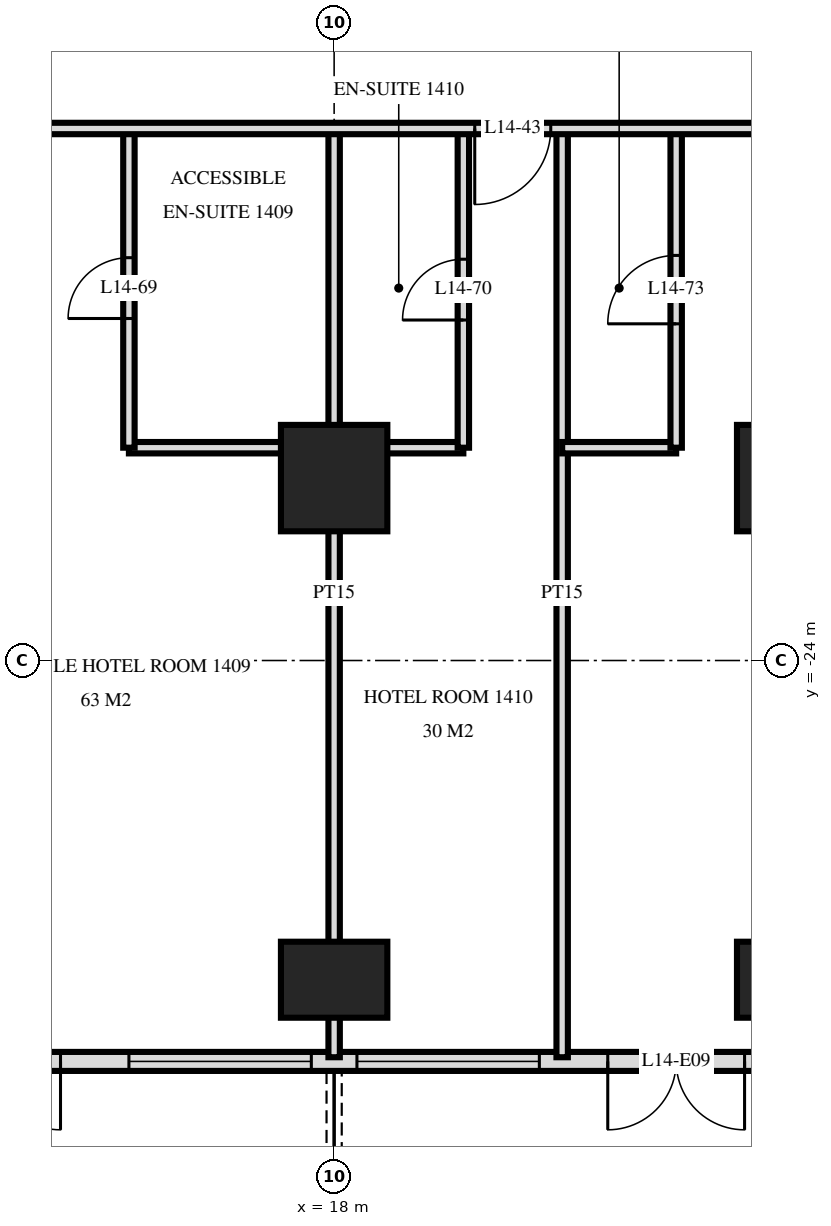
"""IFC4 building model, lengths in metres.
Left out: names, types, materials, properties, quantities, classifications, styles, units other than length and angle.
Written with IfcOpenShell. Run it as: python <this file> out.ifc"""

import sys

from ifc_helpers import new_model, si_unit, direction, frame, frame_2d, origin, origin_2d, place, context, subcontext, project, spatial, rectangle, extrude, element, fill, save


model = new_model("IFC4")
c1 = context("Model", 3, precision=1e-05, world=origin(), true_north=direction((0.0, 1.0)))
c2 = subcontext(c1, "Body", "Model", "MODEL_VIEW")
j1 = project(units=[si_unit("LENGTHUNIT", "METRE"), si_unit("PLANEANGLEUNIT", "RADIAN")], contexts=[c1])
p1 = place(None, origin())
s1 = spatial("IfcSite", under=j1, at=p1, CompositionType="ELEMENT")
p2 = place(p1, origin())
s2 = spatial("IfcBuilding", under=s1, at=p2, CompositionType="ELEMENT")
p3 = place(p2, frame((0.0, 0.0, 60.0)))
s3 = spatial("IfcBuildingStorey", under=s2, at=p3, CompositionType="ELEMENT", Elevation=60.0)
p4 = place(p3, frame((18.0, -28.2, 0.0), z_axis=(0.0, 0.0, 1.0), x_axis=(1.0, 0.0, 0.0)))
e1 = element("IfcColumn", 1, at=p4, inside=s3, PredefinedType="COLUMN", context=c2, shape_type="SweptSolid", body=[
    extrude(rectangle(XDim=1.4, YDim=1.0, at=origin_2d()), origin(), (0.0, 0.0, 1.0), 3.6),
])
p5 = place(p3, frame((18.0, -21.6, 0.0), z_axis=(0.0, 0.0, 1.0), x_axis=(1.0, 0.0, 0.0)))
e2 = element("IfcColumn", 2, at=p5, inside=s3, PredefinedType="COLUMN", context=c2, shape_type="SweptSolid", body=[
    extrude(rectangle(XDim=1.4, YDim=1.4, at=origin_2d()), origin(), (0.0, 0.0, 1.0), 3.6),
])
p6 = place(p3, frame((24.0, -28.2, 0.0), z_axis=(0.0, 0.0, 1.0), x_axis=(1.0, 0.0, 0.0)))
e3 = element("IfcColumn", 3, at=p6, inside=s3, PredefinedType="COLUMN", context=c2, shape_type="SweptSolid", body=[
    extrude(rectangle(XDim=1.4, YDim=1.0, at=origin_2d()), origin(), (0.0, 0.0, 1.0), 3.6),
])
p7 = place(p3, frame((24.0, -21.6, 0.0), z_axis=(0.0, 0.0, 1.0), x_axis=(1.0, 0.0, 0.0)))
e4 = element("IfcColumn", 4, at=p7, inside=s3, PredefinedType="COLUMN", context=c2, shape_type="SweptSolid", body=[
    extrude(rectangle(XDim=1.4, YDim=1.4, at=origin_2d()), origin(), (0.0, 0.0, 1.0), 3.6),
])
p8 = place(p3, frame((-28.775, -29.275, 0.0), z_axis=(0.0, 0.0, 1.0), x_axis=(1.0, 0.0, 0.0)))
e5 = element("IfcWall", 5, at=p8, inside=s3, PredefinedType="SOLIDWALL", context=c2, shape_type="SweptSolid", body=[
    extrude(rectangle(XDim=57.551, YDim=0.25, at=frame_2d((28.775, 0.0))), origin(), (0.0, 0.0, 1.0), 3.32),
])
p9 = place(p8, frame((0.575, 0.0, 0.0)))
e6 = element("IfcOpeningElement", 6, at=p9, cuts=e5, PredefinedType="OPENING", context=c2, shape_type="SweptSolid", body=[
    extrude(rectangle(XDim=1.8, YDim=2.4, at=frame_2d((0.9, 1.2))), frame((0.0, 0.135, 0.0), z_axis=(0.0, -1.0, 0.0), x_axis=(1.0, 0.0, 0.0)), (0.0, 0.0, 1.0), 0.27),
])
p10 = place(p8, frame((5.375, 0.0, 0.0)))
e7 = element("IfcOpeningElement", 7, at=p10, cuts=e5, PredefinedType="OPENING", context=c2, shape_type="SweptSolid", body=[
    extrude(rectangle(XDim=1.8, YDim=2.4, at=frame_2d((0.9, 1.2))), frame((0.0, 0.135, 0.0), z_axis=(0.0, -1.0, 0.0), x_axis=(1.0, 0.0, 0.0)), (0.0, 0.0, 1.0), 0.27),
])
p11 = place(p8, frame((8.075, 0.0, 0.3)))
e8 = element("IfcOpeningElement", 8, at=p11, cuts=e5, PredefinedType="OPENING", context=c2, shape_type="SweptSolid", body=[
    extrude(rectangle(XDim=2.4, YDim=2.1, at=frame_2d((1.2, 1.05))), frame((0.0, 0.135, 0.0), z_axis=(0.0, -1.0, 0.0), x_axis=(1.0, 0.0, 0.0)), (0.0, 0.0, 1.0), 0.27),
])
p12 = place(p8, frame((11.375, 0.0, 0.0)))
e9 = element("IfcOpeningElement", 9, at=p12, cuts=e5, PredefinedType="OPENING", context=c2, shape_type="SweptSolid", body=[
    extrude(rectangle(XDim=1.8, YDim=2.4, at=frame_2d((0.9, 1.2))), frame((0.0, 0.135, 0.0), z_axis=(0.0, -1.0, 0.0), x_axis=(1.0, 0.0, 0.0)), (0.0, 0.0, 1.0), 0.27),
])
p13 = place(p8, frame((14.075, 0.0, 0.3)))
e10 = element("IfcOpeningElement", 10, at=p13, cuts=e5, PredefinedType="OPENING", context=c2, shape_type="SweptSolid", body=[
    extrude(rectangle(XDim=2.4, YDim=2.1, at=frame_2d((1.2, 1.05))), frame((0.0, 0.135, 0.0), z_axis=(0.0, -1.0, 0.0), x_axis=(1.0, 0.0, 0.0)), (0.0, 0.0, 1.0), 0.27),
])
p14 = place(p8, frame((17.375, 0.0, 0.0)))
e11 = element("IfcOpeningElement", 11, at=p14, cuts=e5, PredefinedType="OPENING", context=c2, shape_type="SweptSolid", body=[
    extrude(rectangle(XDim=1.8, YDim=2.4, at=frame_2d((0.9, 1.2))), frame((0.0, 0.135, 0.0), z_axis=(0.0, -1.0, 0.0), x_axis=(1.0, 0.0, 0.0)), (0.0, 0.0, 1.0), 0.27),
])
p15 = place(p8, frame((20.075, 0.0, 0.3)))
e12 = element("IfcOpeningElement", 12, at=p15, cuts=e5, PredefinedType="OPENING", context=c2, shape_type="SweptSolid", body=[
    extrude(rectangle(XDim=2.4, YDim=2.1, at=frame_2d((1.2, 1.05))), frame((0.0, 0.135, 0.0), z_axis=(0.0, -1.0, 0.0), x_axis=(1.0, 0.0, 0.0)), (0.0, 0.0, 1.0), 0.27),
])
p16 = place(p8, frame((23.075, 0.0, 0.3)))
e13 = element("IfcOpeningElement", 13, at=p16, cuts=e5, PredefinedType="OPENING", context=c2, shape_type="SweptSolid", body=[
    extrude(rectangle(XDim=2.4, YDim=2.1, at=frame_2d((1.2, 1.05))), frame((0.0, 0.135, 0.0), z_axis=(0.0, -1.0, 0.0), x_axis=(1.0, 0.0, 0.0)), (0.0, 0.0, 1.0), 0.27),
])
p17 = place(p8, frame((26.375, 0.0, 0.0)))
e14 = element("IfcOpeningElement", 14, at=p17, cuts=e5, PredefinedType="OPENING", context=c2, shape_type="SweptSolid", body=[
    extrude(rectangle(XDim=1.8, YDim=2.4, at=frame_2d((0.9, 1.2))), frame((0.0, 0.135, 0.0), z_axis=(0.0, -1.0, 0.0), x_axis=(1.0, 0.0, 0.0)), (0.0, 0.0, 1.0), 0.27),
])
p18 = place(p8, frame((29.075, 0.0, 0.3)))
e15 = element("IfcOpeningElement", 15, at=p18, cuts=e5, PredefinedType="OPENING", context=c2, shape_type="SweptSolid", body=[
    extrude(rectangle(XDim=2.4, YDim=2.1, at=frame_2d((1.2, 1.05))), frame((0.0, 0.135, 0.0), z_axis=(0.0, -1.0, 0.0), x_axis=(1.0, 0.0, 0.0)), (0.0, 0.0, 1.0), 0.27),
])
p19 = place(p8, frame((32.375, 0.0, 0.0)))
e16 = element("IfcOpeningElement", 16, at=p19, cuts=e5, PredefinedType="OPENING", context=c2, shape_type="SweptSolid", body=[
    extrude(rectangle(XDim=1.8, YDim=2.4, at=frame_2d((0.9, 1.2))), frame((0.0, 0.135, 0.0), z_axis=(0.0, -1.0, 0.0), x_axis=(1.0, 0.0, 0.0)), (0.0, 0.0, 1.0), 0.27),
])
p20 = place(p8, frame((35.375, 0.0, 0.0)))
e17 = element("IfcOpeningElement", 17, at=p20, cuts=e5, PredefinedType="OPENING", context=c2, shape_type="SweptSolid", body=[
    extrude(rectangle(XDim=1.8, YDim=2.4, at=frame_2d((0.9, 1.2))), frame((0.0, 0.135, 0.0), z_axis=(0.0, -1.0, 0.0), x_axis=(1.0, 0.0, 0.0)), (0.0, 0.0, 1.0), 0.27),
])
p21 = place(p8, frame((38.075, 0.0, 0.3)))
e18 = element("IfcOpeningElement", 18, at=p21, cuts=e5, PredefinedType="OPENING", context=c2, shape_type="SweptSolid", body=[
    extrude(rectangle(XDim=2.4, YDim=2.1, at=frame_2d((1.2, 1.05))), frame((0.0, 0.135, 0.0), z_axis=(0.0, -1.0, 0.0), x_axis=(1.0, 0.0, 0.0)), (0.0, 0.0, 1.0), 0.27),
])
p22 = place(p8, frame((41.375, 0.0, 0.0)))
e19 = element("IfcOpeningElement", 19, at=p22, cuts=e5, PredefinedType="OPENING", context=c2, shape_type="SweptSolid", body=[
    extrude(rectangle(XDim=1.8, YDim=2.4, at=frame_2d((0.9, 1.2))), frame((0.0, 0.135, 0.0), z_axis=(0.0, -1.0, 0.0), x_axis=(1.0, 0.0, 0.0)), (0.0, 0.0, 1.0), 0.27),
])
p23 = place(p8, frame((44.075, 0.0, 0.3)))
e20 = element("IfcOpeningElement", 20, at=p23, cuts=e5, PredefinedType="OPENING", context=c2, shape_type="SweptSolid", body=[
    extrude(rectangle(XDim=2.4, YDim=2.1, at=frame_2d((1.2, 1.05))), frame((0.0, 0.135, 0.0), z_axis=(0.0, -1.0, 0.0), x_axis=(1.0, 0.0, 0.0)), (0.0, 0.0, 1.0), 0.27),
])
p24 = place(p8, frame((47.075, 0.0, 0.3)))
e21 = element("IfcOpeningElement", 21, at=p24, cuts=e5, PredefinedType="OPENING", context=c2, shape_type="SweptSolid", body=[
    extrude(rectangle(XDim=2.4, YDim=2.1, at=frame_2d((1.2, 1.05))), frame((0.0, 0.135, 0.0), z_axis=(0.0, -1.0, 0.0), x_axis=(1.0, 0.0, 0.0)), (0.0, 0.0, 1.0), 0.27),
])
p25 = place(p8, frame((50.375, 0.0, 0.0)))
e22 = element("IfcOpeningElement", 22, at=p25, cuts=e5, PredefinedType="OPENING", context=c2, shape_type="SweptSolid", body=[
    extrude(rectangle(XDim=1.8, YDim=2.4, at=frame_2d((0.9, 1.2))), frame((0.0, 0.135, 0.0), z_axis=(0.0, -1.0, 0.0), x_axis=(1.0, 0.0, 0.0)), (0.0, 0.0, 1.0), 0.27),
])
p26 = place(p8, frame((53.375, 0.0, 0.0)))
e23 = element("IfcOpeningElement", 23, at=p26, cuts=e5, PredefinedType="OPENING", context=c2, shape_type="SweptSolid", body=[
    extrude(rectangle(XDim=1.8, YDim=2.4, at=frame_2d((0.9, 1.2))), frame((0.0, 0.135, 0.0), z_axis=(0.0, -1.0, 0.0), x_axis=(1.0, 0.0, 0.0)), (0.0, 0.0, 1.0), 0.27),
])
p27 = place(p3, frame((22.5, -21.2, 0.0), z_axis=(0.0, 0.0, 1.0), x_axis=(0.0, 1.0, 0.0)))
e24 = element("IfcWall", 24, at=p27, inside=s3, PredefinedType="PARTITIONING", context=c2, shape_type="SweptSolid", body=[
    extrude(rectangle(XDim=4.2, YDim=0.15, at=frame_2d((2.1, 0.0))), origin(), (0.0, 0.0, 1.0), 3.32),
])
p28 = place(p27, frame((1.63, 0.0, 0.0)))
e25 = element("IfcOpeningElement", 25, at=p28, cuts=e24, PredefinedType="OPENING", context=c2, shape_type="SweptSolid", body=[
    extrude(rectangle(XDim=0.9, YDim=2.1, at=frame_2d((0.45, 1.05))), frame((0.0, 0.085, 0.0), z_axis=(0.0, -1.0, 0.0), x_axis=(1.0, 0.0, 0.0)), (0.0, 0.0, 1.0), 0.17),
])
p29 = place(p3, frame((21.0, -29.22, 0.0), z_axis=(0.0, 0.0, 1.0), x_axis=(0.0, 1.0, 0.0)))
e26 = element("IfcWall", 26, at=p29, inside=s3, PredefinedType="PARTITIONING", context=c2, shape_type="SweptSolid", body=[
    extrude(rectangle(XDim=12.22, YDim=0.15, at=frame_2d((6.11, 0.0))), origin(), (0.0, 0.0, 1.0), 3.32),
])
p30 = place(p3, frame((19.7, -21.2, 0.0), z_axis=(0.0, 0.0, 1.0), x_axis=(0.0, 1.0, 0.0)))
e27 = element("IfcWall", 27, at=p30, inside=s3, PredefinedType="PARTITIONING", context=c2, shape_type="SweptSolid", body=[
    extrude(rectangle(XDim=4.2, YDim=0.15, at=frame_2d((2.1, 0.0))), origin(), (0.0, 0.0, 1.0), 3.32),
])
p31 = place(p30, frame((1.68, 0.0, 0.0)))
e28 = element("IfcOpeningElement", 28, at=p31, cuts=e27, PredefinedType="OPENING", context=c2, shape_type="SweptSolid", body=[
    extrude(rectangle(XDim=0.8, YDim=2.1, at=frame_2d((0.4, 1.05))), frame((0.0, 0.085, 0.0), z_axis=(0.0, -1.0, 0.0), x_axis=(1.0, 0.0, 0.0)), (0.0, 0.0, 1.0), 0.17),
])
p32 = place(p3, frame((18.0, -29.22, 0.0), z_axis=(0.0, 0.0, 1.0), x_axis=(0.0, 1.0, 0.0)))
e29 = element("IfcWall", 29, at=p32, inside=s3, PredefinedType="PARTITIONING", context=c2, shape_type="SweptSolid", body=[
    extrude(rectangle(XDim=12.22, YDim=0.15, at=frame_2d((6.11, 0.0))), origin(), (0.0, 0.0, 1.0), 3.32),
])
p33 = place(p3, frame((15.3, -21.2, 0.0), z_axis=(0.0, 0.0, 1.0), x_axis=(0.0, 1.0, 0.0)))
e30 = element("IfcWall", 30, at=p33, inside=s3, PredefinedType="PARTITIONING", context=c2, shape_type="SweptSolid", body=[
    extrude(rectangle(XDim=4.2, YDim=0.15, at=frame_2d((2.1, 0.0))), origin(), (0.0, 0.0, 1.0), 3.32),
])
p34 = place(p33, frame((1.7, 0.0, 0.0)))
e31 = element("IfcOpeningElement", 31, at=p34, cuts=e30, PredefinedType="OPENING", context=c2, shape_type="SweptSolid", body=[
    extrude(rectangle(XDim=0.8, YDim=2.1, at=frame_2d((0.4, 1.05))), frame((0.0, 0.085, 0.0), z_axis=(0.0, -1.0, 0.0), x_axis=(1.0, 0.0, 0.0)), (0.0, 0.0, 1.0), 0.17),
])
p35 = place(p3, frame((15.3, -21.2, 0.0), z_axis=(0.0, 0.0, 1.0), x_axis=(1.0, 0.0, 0.0)))
e32 = element("IfcWall", 32, at=p35, inside=s3, PredefinedType="PARTITIONING", context=c2, shape_type="SweptSolid", body=[
    extrude(rectangle(XDim=4.4, YDim=0.15, at=frame_2d((2.2, 0.0))), origin(), (0.0, 0.0, 1.0), 3.32),
])
p36 = place(p3, frame((21.0, -21.2, 0.0), z_axis=(0.0, 0.0, 1.0), x_axis=(1.0, 0.0, 0.0)))
e33 = element("IfcWall", 33, at=p36, inside=s3, PredefinedType="PARTITIONING", context=c2, shape_type="SweptSolid", body=[
    extrude(rectangle(XDim=1.5, YDim=0.15, at=frame_2d((0.75, 0.0))), origin(), (0.0, 0.0, 1.0), 3.32),
])
p37 = place(p3, frame((-33.12, -17.0, 0.0), z_axis=(0.0, 0.0, 1.0), x_axis=(1.0, 0.0, 0.0)))
e34 = element("IfcWall", 34, at=p37, inside=s3, PredefinedType="PARTITIONING", context=c2, shape_type="SweptSolid", body=[
    extrude(rectangle(XDim=66.24, YDim=0.15, at=frame_2d((33.12, 0.0))), origin(), (0.0, 0.0, 1.0), 3.32),
])
p38 = place(p37, frame((12.27, 0.0, 0.0)))
e35 = element("IfcOpeningElement", 35, at=p38, cuts=e34, PredefinedType="OPENING", context=c2, shape_type="SweptSolid", body=[
    extrude(rectangle(XDim=1.0, YDim=2.1, at=frame_2d((0.5, 1.05))), frame((0.0, 0.085, 0.0), z_axis=(0.0, -1.0, 0.0), x_axis=(1.0, 0.0, 0.0)), (0.0, 0.0, 1.0), 0.17),
])
p39 = place(p37, frame((16.97, 0.0, 0.0)))
e36 = element("IfcOpeningElement", 36, at=p39, cuts=e34, PredefinedType="OPENING", context=c2, shape_type="SweptSolid", body=[
    extrude(rectangle(XDim=1.0, YDim=2.1, at=frame_2d((0.5, 1.05))), frame((0.0, 0.085, 0.0), z_axis=(0.0, -1.0, 0.0), x_axis=(1.0, 0.0, 0.0)), (0.0, 0.0, 1.0), 0.17),
])
p40 = place(p37, frame((18.27, 0.0, 0.0)))
e37 = element("IfcOpeningElement", 37, at=p40, cuts=e34, PredefinedType="OPENING", context=c2, shape_type="SweptSolid", body=[
    extrude(rectangle(XDim=1.0, YDim=2.1, at=frame_2d((0.5, 1.05))), frame((0.0, 0.085, 0.0), z_axis=(0.0, -1.0, 0.0), x_axis=(1.0, 0.0, 0.0)), (0.0, 0.0, 1.0), 0.17),
])
p41 = place(p37, frame((22.97, 0.0, 0.0)))
e38 = element("IfcOpeningElement", 38, at=p41, cuts=e34, PredefinedType="OPENING", context=c2, shape_type="SweptSolid", body=[
    extrude(rectangle(XDim=1.0, YDim=2.1, at=frame_2d((0.5, 1.05))), frame((0.0, 0.085, 0.0), z_axis=(0.0, -1.0, 0.0), x_axis=(1.0, 0.0, 0.0)), (0.0, 0.0, 1.0), 0.17),
])
p42 = place(p37, frame((24.27, 0.0, 0.0)))
e39 = element("IfcOpeningElement", 39, at=p42, cuts=e34, PredefinedType="OPENING", context=c2, shape_type="SweptSolid", body=[
    extrude(rectangle(XDim=1.0, YDim=2.1, at=frame_2d((0.5, 1.05))), frame((0.0, 0.085, 0.0), z_axis=(0.0, -1.0, 0.0), x_axis=(1.0, 0.0, 0.0)), (0.0, 0.0, 1.0), 0.17),
])
p43 = place(p37, frame((28.97, 0.0, 0.0)))
e40 = element("IfcOpeningElement", 40, at=p43, cuts=e34, PredefinedType="OPENING", context=c2, shape_type="SweptSolid", body=[
    extrude(rectangle(XDim=1.0, YDim=2.1, at=frame_2d((0.5, 1.05))), frame((0.0, 0.085, 0.0), z_axis=(0.0, -1.0, 0.0), x_axis=(1.0, 0.0, 0.0)), (0.0, 0.0, 1.0), 0.17),
])
p44 = place(p37, frame((30.27, 0.0, 0.0)))
e41 = element("IfcOpeningElement", 41, at=p44, cuts=e34, PredefinedType="OPENING", context=c2, shape_type="SweptSolid", body=[
    extrude(rectangle(XDim=1.0, YDim=2.1, at=frame_2d((0.5, 1.05))), frame((0.0, 0.085, 0.0), z_axis=(0.0, -1.0, 0.0), x_axis=(1.0, 0.0, 0.0)), (0.0, 0.0, 1.0), 0.17),
])
p45 = place(p37, frame((33.82, 0.0, 0.0)))
e42 = element("IfcOpeningElement", 42, at=p45, cuts=e34, PredefinedType="OPENING", context=c2, shape_type="SweptSolid", body=[
    extrude(rectangle(XDim=1.0, YDim=2.1, at=frame_2d((0.5, 1.05))), frame((0.0, 0.085, 0.0), z_axis=(0.0, -1.0, 0.0), x_axis=(1.0, 0.0, 0.0)), (0.0, 0.0, 1.0), 0.17),
])
p46 = place(p37, frame((46.27, 0.0, 0.0)))
e43 = element("IfcOpeningElement", 43, at=p46, cuts=e34, PredefinedType="OPENING", context=c2, shape_type="SweptSolid", body=[
    extrude(rectangle(XDim=1.0, YDim=2.1, at=frame_2d((0.5, 1.05))), frame((0.0, 0.085, 0.0), z_axis=(0.0, -1.0, 0.0), x_axis=(1.0, 0.0, 0.0)), (0.0, 0.0, 1.0), 0.17),
])
p47 = place(p37, frame((52.97, 0.0, 0.0)))
e44 = element("IfcOpeningElement", 44, at=p47, cuts=e34, PredefinedType="OPENING", context=c2, shape_type="SweptSolid", body=[
    extrude(rectangle(XDim=1.0, YDim=2.1, at=frame_2d((0.5, 1.05))), frame((0.0, 0.085, 0.0), z_axis=(0.0, -1.0, 0.0), x_axis=(1.0, 0.0, 0.0)), (0.0, 0.0, 1.0), 0.17),
])
p48 = place(p37, frame((6.05, 0.0, 0.0)))
e45 = element("IfcOpeningElement", 45, at=p48, cuts=e34, PredefinedType="OPENING", context=c2, shape_type="SweptSolid", body=[
    extrude(rectangle(XDim=1.0, YDim=2.1, at=frame_2d((0.5, 1.05))), frame((0.0, 0.085, 0.0), z_axis=(0.0, -1.0, 0.0), x_axis=(1.0, 0.0, 0.0)), (0.0, 0.0, 1.0), 0.17),
])
p49 = place(p37, frame((59.15, 0.0, 0.0)))
e46 = element("IfcOpeningElement", 46, at=p49, cuts=e34, PredefinedType="OPENING", context=c2, shape_type="SweptSolid", body=[
    extrude(rectangle(XDim=1.0, YDim=2.1, at=frame_2d((0.5, 1.05))), frame((0.0, 0.085, 0.0), z_axis=(0.0, -1.0, 0.0), x_axis=(1.0, 0.0, 0.0)), (0.0, 0.0, 1.0), 0.17),
])
p50 = place(p22, frame((0.9, 0.0, 0.0), z_axis=(0.0, 0.0, 1.0), x_axis=(-1.0, 0.0, 0.0)))
e47 = element("IfcDoor", 47, at=p50, inside=s3, OperationType="DOUBLE_DOOR_SINGLE_SWING", PredefinedType="DOOR", context=c2, shape_type="SweptSolid", body=[
    extrude(rectangle(XDim=1.8, YDim=2.4, at=frame_2d((0.0, 1.2))), frame((0.0, -0.025, 0.0), z_axis=(0.0, 1.0, 0.0), x_axis=(-1.0, 0.0, 0.0)), (0.0, 0.0, 1.0), 0.05),
])
fill(e19, e47)
p51 = place(p23, origin())
e48 = element("IfcWindow", 48, at=p51, inside=s3, PartitioningType="SINGLE_PANEL", PredefinedType="WINDOW", context=c2, shape_type="SweptSolid", body=[
    extrude(rectangle(XDim=2.4, YDim=2.1, at=frame_2d((1.2, 1.05))), frame((0.0, 0.03, 0.0), z_axis=(0.0, -1.0, 0.0), x_axis=(1.0, 0.0, 0.0)), (0.0, 0.0, 1.0), 0.06),
])
fill(e20, e48)
p52 = place(p24, origin())
e49 = element("IfcWindow", 49, at=p52, inside=s3, PartitioningType="SINGLE_PANEL", PredefinedType="WINDOW", context=c2, shape_type="SweptSolid", body=[
    extrude(rectangle(XDim=2.4, YDim=2.1, at=frame_2d((1.2, 1.05))), frame((0.0, 0.03, 0.0), z_axis=(0.0, -1.0, 0.0), x_axis=(1.0, 0.0, 0.0)), (0.0, 0.0, 1.0), 0.06),
])
fill(e21, e49)
p53 = place(p25, frame((0.9, 0.0, 0.0), z_axis=(0.0, 0.0, 1.0), x_axis=(-1.0, 0.0, 0.0)))
e50 = element("IfcDoor", 50, at=p53, inside=s3, OperationType="DOUBLE_DOOR_SINGLE_SWING", PredefinedType="DOOR", context=c2, shape_type="SweptSolid", body=[
    extrude(rectangle(XDim=1.8, YDim=2.4, at=frame_2d((0.0, 1.2))), frame((0.0, -0.025, 0.0), z_axis=(0.0, 1.0, 0.0), x_axis=(-1.0, 0.0, 0.0)), (0.0, 0.0, 1.0), 0.05),
])
fill(e22, e50)
p54 = place(p47, frame((0.5, 0.0, 0.0), z_axis=(0.0, 0.0, 1.0), x_axis=(-1.0, 0.0, 0.0)))
e51 = element("IfcDoor", 51, at=p54, inside=s3, OperationType="SINGLE_SWING_LEFT", PredefinedType="DOOR", context=c2, shape_type="SweptSolid", body=[
    extrude(rectangle(XDim=1.0, YDim=2.1, at=frame_2d((0.0, 1.05))), frame((0.0, -0.025, 0.0), z_axis=(0.0, 1.0, 0.0), x_axis=(-1.0, 0.0, 0.0)), (0.0, 0.0, 1.0), 0.05),
])
fill(e44, e51)
p55 = place(p34, origin())
e52 = element("IfcDoor", 52, at=p55, inside=s3, OperationType="SINGLE_SWING_RIGHT", PredefinedType="DOOR", context=c2, shape_type="SweptSolid", body=[
    extrude(rectangle(XDim=0.8, YDim=2.1, at=frame_2d((0.4, 1.05))), frame((0.0, 0.025, 0.0), z_axis=(0.0, -1.0, 0.0), x_axis=(1.0, 0.0, 0.0)), (0.0, 0.0, 1.0), 0.05),
])
fill(e31, e52)
p56 = place(p31, origin())
e53 = element("IfcDoor", 53, at=p56, inside=s3, OperationType="SINGLE_SWING_RIGHT", PredefinedType="DOOR", context=c2, shape_type="SweptSolid", body=[
    extrude(rectangle(XDim=0.8, YDim=2.1, at=frame_2d((0.4, 1.05))), frame((0.0, 0.025, 0.0), z_axis=(0.0, -1.0, 0.0), x_axis=(1.0, 0.0, 0.0)), (0.0, 0.0, 1.0), 0.05),
])
fill(e28, e53)
p57 = place(p28, origin())
e54 = element("IfcDoor", 54, at=p57, inside=s3, OperationType="SINGLE_SWING_RIGHT", PredefinedType="DOOR", context=c2, shape_type="SweptSolid", body=[
    extrude(rectangle(XDim=0.9, YDim=2.1, at=frame_2d((0.45, 1.05))), frame((0.0, 0.025, 0.0), z_axis=(0.0, -1.0, 0.0), x_axis=(1.0, 0.0, 0.0)), (0.0, 0.0, 1.0), 0.05),
])
fill(e25, e54)
save(model, sys.argv[1])
